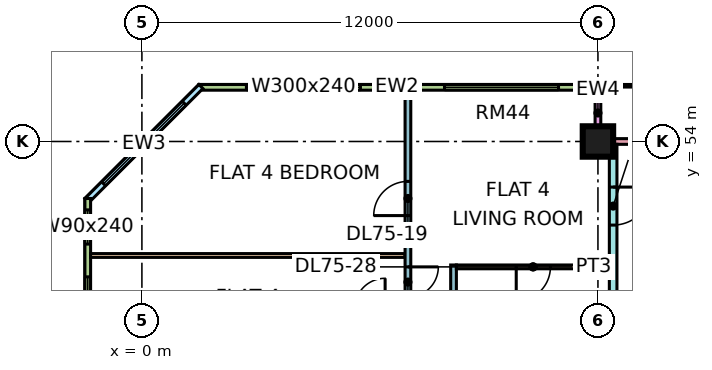
"""IFC4 building model, lengths in metres.
Left out: names, types, materials, properties, quantities, classifications, styles, units other than length and angle.
Written with IfcOpenShell. Run it as: python <this file> out.ifc"""

import sys

from ifc_helpers import new_model, si_unit, direction, frame, frame_2d, origin, origin_2d, place, context, subcontext, project, spatial, rectangle, extrude, element, fill, save


model = new_model("IFC4")
c1 = context("Model", 3, precision=1e-05, world=origin(), true_north=direction((0.0, 1.0)))
c2 = subcontext(c1, "Body", "Model", "MODEL_VIEW")
j1 = project(units=[si_unit("LENGTHUNIT", "METRE"), si_unit("PLANEANGLEUNIT", "RADIAN")], contexts=[c1])
p1 = place(None, origin())
s1 = spatial("IfcSite", under=j1, at=p1, CompositionType="ELEMENT")
p2 = place(p1, origin())
s2 = spatial("IfcBuilding", under=s1, at=p2, CompositionType="ELEMENT")
p3 = place(p2, frame((0.0, 0.0, 318.4)))
s3 = spatial("IfcBuildingStorey", under=s2, at=p3, CompositionType="ELEMENT", Elevation=318.4)
p4 = place(p3, frame((12.0, 54.0, 0.0), z_axis=(0.0, 0.0, 1.0), x_axis=(1.0, 0.0, 0.0)))
e1 = element("IfcColumn", 1, at=p4, inside=s3, PredefinedType="COLUMN", context=c2, shape_type="SweptSolid", body=[
    extrude(rectangle(XDim=0.8, YDim=0.8, at=origin_2d()), origin(), (0.0, 0.0, 1.0), 3.75),
])
p5 = place(p3, frame((22.425, 54.0, 0.0), z_axis=(0.0, 0.0, 1.0), x_axis=(-1.0, 0.0, 0.0)))
e2 = element("IfcWall", 2, at=p5, inside=s3, PredefinedType="SOLIDWALL", context=c2, shape_type="SweptSolid", body=[
    extrude(rectangle(XDim=10.35, YDim=0.15, at=frame_2d((5.175, 0.0))), origin(), (0.0, 0.0, 1.0), 3.3),
])
p6 = place(p5, frame((1.012, 0.0, 0.45)))
e3 = element("IfcOpeningElement", 3, at=p6, cuts=e2, PredefinedType="OPENING", context=c2, shape_type="SweptSolid", body=[
    extrude(rectangle(XDim=4.8, YDim=2.4, at=frame_2d((2.4, 1.2))), frame((0.0, 0.085, 0.0), z_axis=(0.0, -1.0, 0.0), x_axis=(1.0, 0.0, 0.0)), (0.0, 0.0, 1.0), 0.17),
])
p7 = place(p3, frame((12.0, 55.5, 0.0), z_axis=(0.0, 0.0, 1.0), x_axis=(0.0, -1.0, 0.0)))
e4 = element("IfcWall", 4, at=p7, inside=s3, PredefinedType="SOLIDWALL", context=c2, shape_type="SweptSolid", body=[
    extrude(rectangle(XDim=1.5, YDim=0.15, at=frame_2d((0.75, 0.0))), origin(), (0.0, 0.0, 1.0), 3.3),
])
p8 = place(p3, frame((11.925, 55.425, 0.0), z_axis=(0.0, 0.0, 1.0), x_axis=(-1.0, 0.0, 0.0)))
e5 = element("IfcWall", 5, at=p8, inside=s3, PredefinedType="SOLIDWALL", context=c2, shape_type="SweptSolid", body=[
    extrude(rectangle(XDim=10.425, YDim=0.15, at=frame_2d((5.212, 0.0))), origin(), (0.0, 0.0, 1.0), 3.3),
])
p9 = place(p8, frame((0.962, 0.0, 0.45)))
e6 = element("IfcOpeningElement", 6, at=p9, cuts=e5, PredefinedType="OPENING", context=c2, shape_type="SweptSolid", body=[
    extrude(rectangle(XDim=3.0, YDim=2.4, at=frame_2d((1.5, 1.2))), frame((0.0, 0.085, 0.0), z_axis=(0.0, -1.0, 0.0), x_axis=(1.0, 0.0, 0.0)), (0.0, 0.0, 1.0), 0.17),
])
p10 = place(p8, frame((6.175, 0.0, 0.45)))
e7 = element("IfcOpeningElement", 7, at=p10, cuts=e5, PredefinedType="OPENING", context=c2, shape_type="SweptSolid", body=[
    extrude(rectangle(XDim=3.0, YDim=2.4, at=frame_2d((1.5, 1.2))), frame((0.0, 0.085, 0.0), z_axis=(0.0, -1.0, 0.0), x_axis=(1.0, 0.0, 0.0)), (0.0, 0.0, 1.0), 0.17),
])
p11 = place(p3, frame((1.553, 55.447, 0.0), z_axis=(0.0, 0.0, 1.0), x_axis=(-0.707106781187, -0.707106781187, 0.0)))
e8 = element("IfcWall", 8, at=p11, inside=s3, PredefinedType="SOLIDWALL", context=c2, shape_type="SweptSolid", body=[
    extrude(rectangle(XDim=4.243, YDim=0.15, at=frame_2d((2.121, 0.0))), origin(), (0.0, 0.0, 1.0), 3.3),
])
p12 = place(p11, frame((0.621, 0.0, 0.45)))
e9 = element("IfcOpeningElement", 9, at=p12, cuts=e8, PredefinedType="OPENING", context=c2, shape_type="SweptSolid", body=[
    extrude(rectangle(XDim=3.0, YDim=2.4, at=frame_2d((1.5, 1.2))), frame((0.0, 0.085, 0.0), z_axis=(0.0, -1.0, 0.0), x_axis=(1.0, 0.0, 0.0)), (0.0, 0.0, 1.0), 0.17),
])
p13 = place(p3, frame((-1.425, 52.5, 0.0), z_axis=(0.0, 0.0, 1.0), x_axis=(0.0, -1.0, 0.0)))
e10 = element("IfcWall", 10, at=p13, inside=s3, PredefinedType="SOLIDWALL", context=c2, shape_type="SweptSolid", body=[
    extrude(rectangle(XDim=4.425, YDim=0.15, at=frame_2d((2.212, 0.0))), origin(), (0.0, 0.0, 1.0), 3.3),
])
p14 = place(p13, frame((0.3, 0.0, 0.45)))
e11 = element("IfcOpeningElement", 11, at=p14, cuts=e10, PredefinedType="OPENING", context=c2, shape_type="SweptSolid", body=[
    extrude(rectangle(XDim=0.9, YDim=2.4, at=frame_2d((0.45, 1.2))), frame((0.0, 0.085, 0.0), z_axis=(0.0, -1.0, 0.0), x_axis=(1.0, 0.0, 0.0)), (0.0, 0.0, 1.0), 0.17),
])
p15 = place(p13, frame((2.062, 0.0, 0.45)))
e12 = element("IfcOpeningElement", 12, at=p15, cuts=e10, PredefinedType="OPENING", context=c2, shape_type="SweptSolid", body=[
    extrude(rectangle(XDim=1.8, YDim=2.4, at=frame_2d((0.9, 1.2))), frame((0.0, 0.085, 0.0), z_axis=(0.0, -1.0, 0.0), x_axis=(1.0, 0.0, 0.0)), (0.0, 0.0, 1.0), 0.17),
])
p16 = place(p3, frame((-1.351, 51.0, 0.0), z_axis=(0.0, 0.0, 1.0), x_axis=(1.0, 0.0, 0.0)))
e13 = element("IfcWall", 13, at=p16, inside=s3, PredefinedType="PARTITIONING", context=c2, shape_type="SweptSolid", body=[
    extrude(rectangle(XDim=8.276, YDim=0.1, at=frame_2d((4.138, 0.0))), origin(), (0.0, 0.0, 1.0), 3.3),
])
p17 = place(p3, frame((7.0, 48.075, 0.0), z_axis=(0.0, 0.0, 1.0), x_axis=(0.0, 1.0, 0.0)))
e14 = element("IfcWall", 14, at=p17, inside=s3, PredefinedType="PARTITIONING", context=c2, shape_type="SweptSolid", body=[
    extrude(rectangle(XDim=7.275, YDim=0.15, at=frame_2d((3.638, 0.0))), origin(), (0.0, 0.0, 1.0), 3.3),
])
p18 = place(p17, frame((3.975, 0.0, 0.0)))
e15 = element("IfcOpeningElement", 15, at=p18, cuts=e14, PredefinedType="OPENING", context=c2, shape_type="SweptSolid", body=[
    extrude(rectangle(XDim=0.9, YDim=2.1, at=frame_2d((0.45, 1.05))), frame((0.0, 0.085, 0.0), z_axis=(0.0, -1.0, 0.0), x_axis=(1.0, 0.0, 0.0)), (0.0, 0.0, 1.0), 0.17),
])
p19 = place(p17, frame((1.825, 0.0, 0.0)))
e16 = element("IfcOpeningElement", 16, at=p19, cuts=e14, PredefinedType="OPENING", context=c2, shape_type="SweptSolid", body=[
    extrude(rectangle(XDim=0.8, YDim=2.1, at=frame_2d((0.4, 1.05))), frame((0.0, 0.085, 0.0), z_axis=(0.0, -1.0, 0.0), x_axis=(1.0, 0.0, 0.0)), (0.0, 0.0, 1.0), 0.17),
])
p20 = place(p3, frame((8.2, 36.1, 0.0), z_axis=(0.0, 0.0, 1.0), x_axis=(0.0, 1.0, 0.0)))
e17 = element("IfcWall", 17, at=p20, inside=s3, PredefinedType="PARTITIONING", context=c2, shape_type="SweptSolid", body=[
    extrude(rectangle(XDim=14.65, YDim=0.15, at=frame_2d((7.325, 0.0))), origin(), (0.0, 0.0, 1.0), 3.3),
])
p21 = place(p20, frame((9.65, 0.0, 0.0)))
e18 = element("IfcOpeningElement", 18, at=p21, cuts=e17, PredefinedType="OPENING", context=c2, shape_type="SweptSolid", body=[
    extrude(rectangle(XDim=0.8, YDim=2.1, at=frame_2d((0.4, 1.05))), frame((0.0, 0.085, 0.0), z_axis=(0.0, -1.0, 0.0), x_axis=(1.0, 0.0, 0.0)), (0.0, 0.0, 1.0), 0.17),
])
p22 = place(p20, frame((5.15, 0.0, 0.0)))
e19 = element("IfcOpeningElement", 19, at=p22, cuts=e17, PredefinedType="OPENING", context=c2, shape_type="SweptSolid", body=[
    extrude(rectangle(XDim=0.9, YDim=2.1, at=frame_2d((0.45, 1.05))), frame((0.0, 0.085, 0.0), z_axis=(0.0, -1.0, 0.0), x_axis=(1.0, 0.0, 0.0)), (0.0, 0.0, 1.0), 0.17),
])
p23 = place(p20, frame((0.65, 0.0, 0.0)))
e20 = element("IfcOpeningElement", 20, at=p23, cuts=e17, PredefinedType="OPENING", context=c2, shape_type="SweptSolid", body=[
    extrude(rectangle(XDim=0.9, YDim=2.1, at=frame_2d((0.45, 1.05))), frame((0.0, 0.085, 0.0), z_axis=(0.0, -1.0, 0.0), x_axis=(1.0, 0.0, 0.0)), (0.0, 0.0, 1.0), 0.17),
])
p24 = place(p3, frame((8.275, 50.7, 0.0), z_axis=(0.0, 0.0, 1.0), x_axis=(1.0, 0.0, 0.0)))
e21 = element("IfcWall", 21, at=p24, inside=s3, PredefinedType="PARTITIONING", context=c2, shape_type="SweptSolid", body=[
    extrude(rectangle(XDim=4.025, YDim=0.1, at=frame_2d((2.013, 0.0))), origin(), (0.0, 0.0, 1.0), 3.3),
])
p25 = place(p24, frame((1.575, 0.0, 0.0)))
e22 = element("IfcOpeningElement", 22, at=p25, cuts=e21, PredefinedType="OPENING", context=c2, shape_type="SweptSolid", body=[
    extrude(rectangle(XDim=0.9, YDim=2.1, at=frame_2d((0.45, 1.05))), frame((0.0, 0.06, 0.0), z_axis=(0.0, -1.0, 0.0), x_axis=(1.0, 0.0, 0.0)), (0.0, 0.0, 1.0), 0.12),
])
p26 = place(p3, frame((12.4, 20.0, 0.0), z_axis=(0.0, 0.0, 1.0), x_axis=(0.0, 1.0, 0.0)))
e23 = element("IfcWall", 23, at=p26, inside=s3, PredefinedType="PARTITIONING", context=c2, shape_type="SweptSolid", body=[
    extrude(rectangle(XDim=33.926, YDim=0.2, at=frame_2d((16.963, 0.0))), origin(), (0.0, 0.0, 1.0), 3.3),
])
p27 = place(p26, frame((31.8, 0.0, 0.0)))
e24 = element("IfcOpeningElement", 24, at=p27, cuts=e23, PredefinedType="OPENING", context=c2, shape_type="SweptSolid", body=[
    extrude(rectangle(XDim=1.0, YDim=2.1, at=frame_2d((0.5, 1.05))), frame((0.0, 0.11, 0.0), z_axis=(0.0, -1.0, 0.0), x_axis=(1.0, 0.0, 0.0)), (0.0, 0.0, 1.0), 0.22),
])
p28 = place(p26, frame((0.6, 0.0, 0.0)))
e25 = element("IfcOpeningElement", 25, at=p28, cuts=e23, PredefinedType="OPENING", context=c2, shape_type="SweptSolid", body=[
    extrude(rectangle(XDim=1.2, YDim=2.1, at=frame_2d((0.6, 1.05))), frame((0.0, 0.11, 0.0), z_axis=(0.0, -1.0, 0.0), x_axis=(1.0, 0.0, 0.0)), (0.0, 0.0, 1.0), 0.22),
])
p29 = place(p26, frame((4.5, 0.0, 0.0)))
e26 = element("IfcOpeningElement", 26, at=p29, cuts=e23, PredefinedType="OPENING", context=c2, shape_type="SweptSolid", body=[
    extrude(rectangle(XDim=1.0, YDim=2.1, at=frame_2d((0.5, 1.05))), frame((0.0, 0.11, 0.0), z_axis=(0.0, -1.0, 0.0), x_axis=(1.0, 0.0, 0.0)), (0.0, 0.0, 1.0), 0.22),
])
p30 = place(p9, origin())
e27 = element("IfcWindow", 27, at=p30, inside=s3, PartitioningType="SINGLE_PANEL", PredefinedType="WINDOW", context=c2, shape_type="SweptSolid", body=[
    extrude(rectangle(XDim=3.0, YDim=2.4, at=frame_2d((1.5, 1.2))), frame((0.0, 0.03, 0.0), z_axis=(0.0, -1.0, 0.0), x_axis=(1.0, 0.0, 0.0)), (0.0, 0.0, 1.0), 0.06),
])
fill(e6, e27)
p31 = place(p10, origin())
e28 = element("IfcWindow", 28, at=p31, inside=s3, PartitioningType="SINGLE_PANEL", PredefinedType="WINDOW", context=c2, shape_type="SweptSolid", body=[
    extrude(rectangle(XDim=3.0, YDim=2.4, at=frame_2d((1.5, 1.2))), frame((0.0, 0.03, 0.0), z_axis=(0.0, -1.0, 0.0), x_axis=(1.0, 0.0, 0.0)), (0.0, 0.0, 1.0), 0.06),
])
fill(e7, e28)
p32 = place(p12, origin())
e29 = element("IfcWindow", 29, at=p32, inside=s3, PartitioningType="SINGLE_PANEL", PredefinedType="WINDOW", context=c2, shape_type="SweptSolid", body=[
    extrude(rectangle(XDim=3.0, YDim=2.4, at=frame_2d((1.5, 1.2))), frame((0.0, 0.03, 0.0), z_axis=(0.0, -1.0, 0.0), x_axis=(1.0, 0.0, 0.0)), (0.0, 0.0, 1.0), 0.06),
])
fill(e9, e29)
p33 = place(p14, origin())
e30 = element("IfcWindow", 30, at=p33, inside=s3, PartitioningType="SINGLE_PANEL", PredefinedType="WINDOW", context=c2, shape_type="SweptSolid", body=[
    extrude(rectangle(XDim=0.9, YDim=2.4, at=frame_2d((0.45, 1.2))), frame((0.0, 0.03, 0.0), z_axis=(0.0, -1.0, 0.0), x_axis=(1.0, 0.0, 0.0)), (0.0, 0.0, 1.0), 0.06),
])
fill(e11, e30)
p34 = place(p15, origin())
e31 = element("IfcWindow", 31, at=p34, inside=s3, PartitioningType="SINGLE_PANEL", PredefinedType="WINDOW", context=c2, shape_type="SweptSolid", body=[
    extrude(rectangle(XDim=1.8, YDim=2.4, at=frame_2d((0.9, 1.2))), frame((0.0, 0.03, 0.0), z_axis=(0.0, -1.0, 0.0), x_axis=(1.0, 0.0, 0.0)), (0.0, 0.0, 1.0), 0.06),
])
fill(e12, e31)
p35 = place(p18, origin())
e32 = element("IfcDoor", 32, at=p35, inside=s3, OperationType="SINGLE_SWING_LEFT", PredefinedType="DOOR", context=c2, shape_type="SweptSolid", body=[
    extrude(rectangle(XDim=0.9, YDim=2.1, at=frame_2d((0.45, 1.05))), frame((0.0, 0.025, 0.0), z_axis=(0.0, -1.0, 0.0), x_axis=(1.0, 0.0, 0.0)), (0.0, 0.0, 1.0), 0.05),
])
fill(e15, e32)
p36 = place(p27, origin())
e33 = element("IfcDoor", 33, at=p36, inside=s3, OperationType="SINGLE_SWING_RIGHT", PredefinedType="DOOR", context=c2, shape_type="SweptSolid", body=[
    extrude(rectangle(XDim=1.0, YDim=2.1, at=frame_2d((0.5, 1.05))), frame((0.0, 0.025, 0.0), z_axis=(0.0, -1.0, 0.0), x_axis=(1.0, 0.0, 0.0)), (0.0, 0.0, 1.0), 0.05),
])
fill(e24, e33)
p37 = place(p19, origin())
e34 = element("IfcDoor", 34, at=p37, inside=s3, OperationType="SINGLE_SWING_RIGHT", PredefinedType="DOOR", context=c2, shape_type="SweptSolid", body=[
    extrude(rectangle(XDim=0.8, YDim=2.1, at=frame_2d((0.4, 1.05))), frame((0.0, 0.025, 0.0), z_axis=(0.0, -1.0, 0.0), x_axis=(1.0, 0.0, 0.0)), (0.0, 0.0, 1.0), 0.05),
])
fill(e16, e34)
p38 = place(p25, frame((0.9, 0.0, 0.0), z_axis=(0.0, 0.0, 1.0), x_axis=(-1.0, 0.0, 0.0)))
e35 = element("IfcDoor", 35, at=p38, inside=s3, OperationType="SINGLE_SWING_LEFT", PredefinedType="DOOR", context=c2, shape_type="SweptSolid", body=[
    extrude(rectangle(XDim=0.9, YDim=2.1, at=frame_2d((0.45, 1.05))), frame((0.0, 0.025, 0.0), z_axis=(0.0, -1.0, 0.0), x_axis=(1.0, 0.0, 0.0)), (0.0, 0.0, 1.0), 0.05),
])
fill(e22, e35)
save(model, sys.argv[1])
